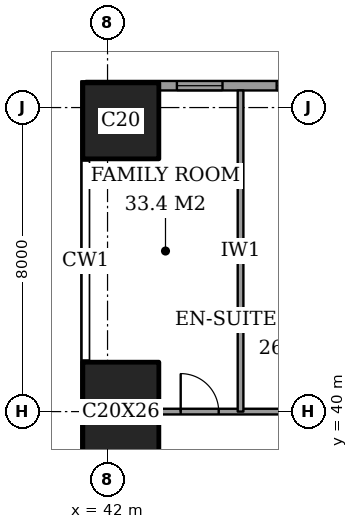
"""IFC4 building model, lengths in metres.
Left out: names, types, materials, properties, quantities, classifications, styles, units other than length and angle.
Written with IfcOpenShell. Run it as: python <this file> out.ifc"""

import sys

from ifc_helpers import new_model, si_unit, direction, frame, frame_2d, origin, origin_2d, place, context, subcontext, project, spatial, rectangle, extrude, element, fill, save


model = new_model("IFC4")
c1 = context("Model", 3, precision=1e-05, world=origin(), true_north=direction((0.0, 1.0)))
c2 = subcontext(c1, "Body", "Model", "MODEL_VIEW")
j1 = project(units=[si_unit("LENGTHUNIT", "METRE"), si_unit("PLANEANGLEUNIT", "RADIAN")], contexts=[c1])
p1 = place(None, origin())
s1 = spatial("IfcSite", under=j1, at=p1, CompositionType="ELEMENT")
p2 = place(p1, origin())
s2 = spatial("IfcBuilding", under=s1, at=p2, CompositionType="ELEMENT")
p3 = place(p2, frame((0.0, 0.0, 237.6)))
s3 = spatial("IfcBuildingStorey", under=s2, at=p3, CompositionType="ELEMENT", Elevation=237.6)
p4 = place(p3, frame((42.35, 40.0, 0.0), z_axis=(0.0, 0.0, 1.0), x_axis=(1.0, 0.0, 0.0)))
e1 = element("IfcColumn", 1, at=p4, inside=s3, PredefinedType="COLUMN", context=c2, shape_type="SweptSolid", body=[
    extrude(rectangle(XDim=2.0, YDim=2.6, at=origin_2d()), origin(), (0.0, 0.0, 1.0), 3.6),
])
p5 = place(p3, frame((42.35, 47.65, 0.0), z_axis=(0.0, 0.0, 1.0), x_axis=(1.0, 0.0, 0.0)))
e2 = element("IfcColumn", 2, at=p5, inside=s3, PredefinedType="COLUMN", context=c2, shape_type="SweptSolid", body=[
    extrude(rectangle(XDim=2.0, YDim=2.0, at=origin_2d()), origin(), (0.0, 0.0, 1.0), 3.6),
])
p6 = place(p3, frame((62.825, 48.575, 0.0), z_axis=(0.0, 0.0, 1.0), x_axis=(-1.0, 0.0, 0.0)))
e3 = element("IfcWall", 3, at=p6, inside=s3, PredefinedType="SOLIDWALL", context=c2, shape_type="SweptSolid", body=[
    extrude(rectangle(XDim=21.4, YDim=0.25, at=frame_2d((10.7, 0.0))), origin(), (0.0, 0.0, 1.0), 3.6),
])
p7 = place(p6, frame((0.55, 0.0, 0.6)))
e4 = element("IfcOpeningElement", 4, at=p7, cuts=e3, PredefinedType="OPENING", context=c2, shape_type="SweptSolid", body=[
    extrude(rectangle(XDim=1.2, YDim=2.0, at=frame_2d((0.6, 1.0))), frame((0.0, 0.135, 0.0), z_axis=(0.0, -1.0, 0.0), x_axis=(1.0, 0.0, 0.0)), (0.0, 0.0, 1.0), 0.27),
])
p8 = place(p6, frame((2.475, 0.0, 0.6)))
e5 = element("IfcOpeningElement", 5, at=p8, cuts=e3, PredefinedType="OPENING", context=c2, shape_type="SweptSolid", body=[
    extrude(rectangle(XDim=1.2, YDim=2.0, at=frame_2d((0.6, 1.0))), frame((0.0, 0.135, 0.0), z_axis=(0.0, -1.0, 0.0), x_axis=(1.0, 0.0, 0.0)), (0.0, 0.0, 1.0), 0.27),
])
p9 = place(p6, frame((6.225, 0.0, 0.6)))
e6 = element("IfcOpeningElement", 6, at=p9, cuts=e3, PredefinedType="OPENING", context=c2, shape_type="SweptSolid", body=[
    extrude(rectangle(XDim=1.2, YDim=2.0, at=frame_2d((0.6, 1.0))), frame((0.0, 0.135, 0.0), z_axis=(0.0, -1.0, 0.0), x_axis=(1.0, 0.0, 0.0)), (0.0, 0.0, 1.0), 0.27),
])
p10 = place(p6, frame((8.4, 0.0, 0.6)))
e7 = element("IfcOpeningElement", 7, at=p10, cuts=e3, PredefinedType="OPENING", context=c2, shape_type="SweptSolid", body=[
    extrude(rectangle(XDim=1.2, YDim=2.0, at=frame_2d((0.6, 1.0))), frame((0.0, 0.135, 0.0), z_axis=(0.0, -1.0, 0.0), x_axis=(1.0, 0.0, 0.0)), (0.0, 0.0, 1.0), 0.27),
])
p11 = place(p6, frame((10.325, 0.0, 0.6)))
e8 = element("IfcOpeningElement", 8, at=p11, cuts=e3, PredefinedType="OPENING", context=c2, shape_type="SweptSolid", body=[
    extrude(rectangle(XDim=1.2, YDim=2.0, at=frame_2d((0.6, 1.0))), frame((0.0, 0.135, 0.0), z_axis=(0.0, -1.0, 0.0), x_axis=(1.0, 0.0, 0.0)), (0.0, 0.0, 1.0), 0.27),
])
p12 = place(p6, frame((15.175, 0.0, 0.6)))
e9 = element("IfcOpeningElement", 9, at=p12, cuts=e3, PredefinedType="OPENING", context=c2, shape_type="SweptSolid", body=[
    extrude(rectangle(XDim=1.2, YDim=2.0, at=frame_2d((0.6, 1.0))), frame((0.0, 0.135, 0.0), z_axis=(0.0, -1.0, 0.0), x_axis=(1.0, 0.0, 0.0)), (0.0, 0.0, 1.0), 0.27),
])
p13 = place(p6, frame((17.8, 0.0, 0.6)))
e10 = element("IfcOpeningElement", 10, at=p13, cuts=e3, PredefinedType="OPENING", context=c2, shape_type="SweptSolid", body=[
    extrude(rectangle(XDim=1.2, YDim=2.0, at=frame_2d((0.6, 1.0))), frame((0.0, 0.135, 0.0), z_axis=(0.0, -1.0, 0.0), x_axis=(1.0, 0.0, 0.0)), (0.0, 0.0, 1.0), 0.27),
])
p14 = place(p3, frame((43.35, 40.0, 0.0), z_axis=(0.0, 0.0, 1.0), x_axis=(1.0, 0.0, 0.0)))
e11 = element("IfcWall", 11, at=p14, inside=s3, PredefinedType="PARTITIONING", context=c2, shape_type="SweptSolid", body=[
    extrude(rectangle(XDim=5.45, YDim=0.15, at=frame_2d((2.725, 0.0))), origin(), (0.0, 0.0, 1.0), 3.35),
])
p15 = place(p14, frame((0.575, 0.0, 0.0)))
e12 = element("IfcOpeningElement", 12, at=p15, cuts=e11, PredefinedType="OPENING", context=c2, shape_type="SweptSolid", body=[
    extrude(rectangle(XDim=1.0, YDim=2.1, at=frame_2d((0.5, 1.05))), frame((0.0, 0.085, 0.0), z_axis=(0.0, -1.0, 0.0), x_axis=(1.0, 0.0, 0.0)), (0.0, 0.0, 1.0), 0.17),
])
p16 = place(p3, frame((45.5, 40.0, 0.0), z_axis=(0.0, 0.0, 1.0), x_axis=(0.0, 1.0, 0.0)))
e13 = element("IfcWall", 13, at=p16, inside=s3, PredefinedType="PARTITIONING", context=c2, shape_type="SweptSolid", body=[
    extrude(rectangle(XDim=8.45, YDim=0.15, at=frame_2d((4.225, 0.0))), origin(), (0.0, 0.0, 1.0), 3.35),
])
p17 = place(p12, origin())
e14 = element("IfcWindow", 14, at=p17, inside=s3, PartitioningType="SINGLE_PANEL", PredefinedType="WINDOW", context=c2, shape_type="SweptSolid", body=[
    extrude(rectangle(XDim=1.2, YDim=2.0, at=frame_2d((0.6, 1.0))), frame((0.0, 0.03, 0.0), z_axis=(0.0, -1.0, 0.0), x_axis=(1.0, 0.0, 0.0)), (0.0, 0.0, 1.0), 0.06),
])
fill(e9, e14)
p18 = place(p13, origin())
e15 = element("IfcWindow", 15, at=p18, inside=s3, PartitioningType="SINGLE_PANEL", PredefinedType="WINDOW", context=c2, shape_type="SweptSolid", body=[
    extrude(rectangle(XDim=1.2, YDim=2.0, at=frame_2d((0.6, 1.0))), frame((0.0, 0.03, 0.0), z_axis=(0.0, -1.0, 0.0), x_axis=(1.0, 0.0, 0.0)), (0.0, 0.0, 1.0), 0.06),
])
fill(e10, e15)
p19 = place(p15, origin())
e16 = element("IfcDoor", 16, at=p19, inside=s3, OperationType="SINGLE_SWING_RIGHT", PredefinedType="DOOR", context=c2, shape_type="SweptSolid", body=[
    extrude(rectangle(XDim=1.0, YDim=2.1, at=frame_2d((0.5, 1.05))), frame((0.0, 0.025, 0.0), z_axis=(0.0, -1.0, 0.0), x_axis=(1.0, 0.0, 0.0)), (0.0, 0.0, 1.0), 0.05),
])
fill(e12, e16)
save(model, sys.argv[1])
